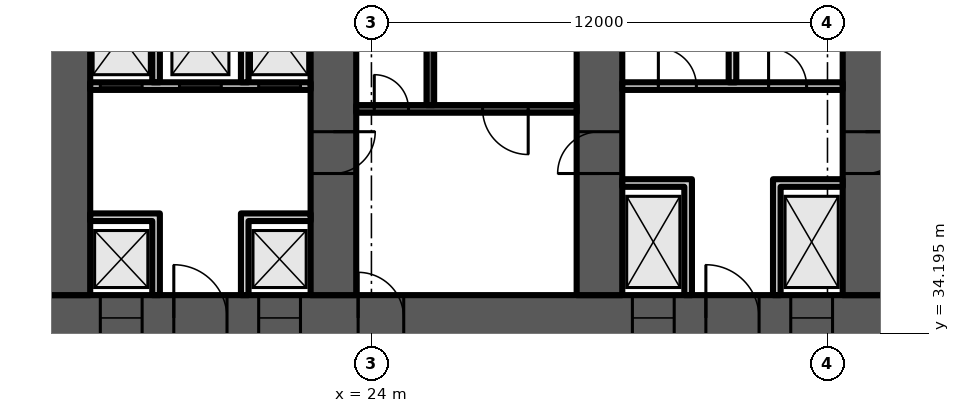
"""IFC4 building model, lengths in metres.
Left out: names, types, materials, properties, quantities, classifications, styles, units other than length and angle.
Written with IfcOpenShell. Run it as: python <this file> out.ifc"""

import sys

from ifc_helpers import new_model, si_unit, direction, frame, frame_2d, origin, place, context, subcontext, project, spatial, polyline, rectangle, outline, extrude, element, fill, save


model = new_model("IFC4")
c1 = context("Model", 3, precision=1e-05, world=origin(), true_north=direction((0.0, 1.0)))
c2 = subcontext(c1, "Body", "Model", "MODEL_VIEW")
j1 = project(units=[si_unit("LENGTHUNIT", "METRE"), si_unit("PLANEANGLEUNIT", "RADIAN")], contexts=[c1])
p1 = place(None, origin())
s1 = spatial("IfcSite", under=j1, at=p1, CompositionType="ELEMENT")
p2 = place(p1, origin())
s2 = spatial("IfcBuilding", under=s1, at=p2, CompositionType="ELEMENT")
p3 = place(p2, frame((0.0, 0.0, 59.5)))
s3 = spatial("IfcBuildingStorey", under=s2, at=p3, CompositionType="ELEMENT", Elevation=59.5)
p4 = place(p3, frame((9.0, 34.6, 0.0), z_axis=(0.0, 0.0, 1.0), x_axis=(1.0, 0.0, 0.0)))
e1 = element("IfcWall", 1, at=p4, inside=s3, PredefinedType="SHEAR", context=c2, shape_type="SweptSolid", body=[
    extrude(rectangle(XDim=56.0, YDim=1.2, at=frame_2d((28.0, 0.0))), origin(), (0.0, 0.0, 1.0), 3.6),
])
p5 = place(p4, frame((2.0, 0.0, 0.0)))
e2 = element("IfcOpeningElement", 2, at=p5, cuts=e1, PredefinedType="OPENING", context=c2, shape_type="SweptSolid", body=[
    extrude(rectangle(XDim=1.0, YDim=2.1, at=frame_2d((0.5, 1.05))), frame((0.0, 0.61, 0.0), z_axis=(0.0, -1.0, 0.0), x_axis=(1.0, 0.0, 0.0)), (0.0, 0.0, 1.0), 1.22),
])
p6 = place(p4, frame((4.6, 0.0, 0.0)))
e3 = element("IfcOpeningElement", 3, at=p6, cuts=e1, PredefinedType="OPENING", context=c2, shape_type="SweptSolid", body=[
    extrude(rectangle(XDim=1.0, YDim=2.1, at=frame_2d((0.5, 1.05))), frame((0.0, 0.61, 0.0), z_axis=(0.0, -1.0, 0.0), x_axis=(1.0, 0.0, 0.0)), (0.0, 0.0, 1.0), 1.22),
])
p7 = place(p4, frame((7.867, 0.0, 0.0)))
e4 = element("IfcOpeningElement", 4, at=p7, cuts=e1, PredefinedType="OPENING", context=c2, shape_type="SweptSolid", body=[
    extrude(rectangle(XDim=1.1, YDim=2.1, at=frame_2d((0.55, 1.05))), frame((0.0, 0.61, 0.0), z_axis=(0.0, -1.0, 0.0), x_axis=(1.0, 0.0, 0.0)), (0.0, 0.0, 1.0), 1.22),
])
p8 = place(p4, frame((12.033, 0.0, 0.0)))
e5 = element("IfcOpeningElement", 5, at=p8, cuts=e1, PredefinedType="OPENING", context=c2, shape_type="SweptSolid", body=[
    extrude(rectangle(XDim=1.1, YDim=2.1, at=frame_2d((0.55, 1.05))), frame((0.0, 0.61, 0.0), z_axis=(0.0, -1.0, 0.0), x_axis=(1.0, 0.0, 0.0)), (0.0, 0.0, 1.0), 1.22),
])
p9 = place(p4, frame((9.8, 0.0, 0.0)))
e6 = element("IfcOpeningElement", 6, at=p9, cuts=e1, PredefinedType="OPENING", context=c2, shape_type="SweptSolid", body=[
    extrude(rectangle(XDim=1.4, YDim=2.1, at=frame_2d((0.7, 1.05))), frame((0.0, 0.61, 0.0), z_axis=(0.0, -1.0, 0.0), x_axis=(1.0, 0.0, 0.0)), (0.0, 0.0, 1.0), 1.22),
])
p10 = place(p4, frame((14.65, 0.0, 0.0)))
e7 = element("IfcOpeningElement", 7, at=p10, cuts=e1, PredefinedType="OPENING", context=c2, shape_type="SweptSolid", body=[
    extrude(rectangle(XDim=1.2, YDim=2.1, at=frame_2d((0.6, 1.05))), frame((0.0, 0.61, 0.0), z_axis=(0.0, -1.0, 0.0), x_axis=(1.0, 0.0, 0.0)), (0.0, 0.0, 1.0), 1.22),
])
p11 = place(p4, frame((21.867, 0.0, 0.0)))
e8 = element("IfcOpeningElement", 8, at=p11, cuts=e1, PredefinedType="OPENING", context=c2, shape_type="SweptSolid", body=[
    extrude(rectangle(XDim=1.1, YDim=2.1, at=frame_2d((0.55, 1.05))), frame((0.0, 0.61, 0.0), z_axis=(0.0, -1.0, 0.0), x_axis=(1.0, 0.0, 0.0)), (0.0, 0.0, 1.0), 1.22),
])
p12 = place(p4, frame((26.033, 0.0, 0.0)))
e9 = element("IfcOpeningElement", 9, at=p12, cuts=e1, PredefinedType="OPENING", context=c2, shape_type="SweptSolid", body=[
    extrude(rectangle(XDim=1.1, YDim=2.1, at=frame_2d((0.55, 1.05))), frame((0.0, 0.61, 0.0), z_axis=(0.0, -1.0, 0.0), x_axis=(1.0, 0.0, 0.0)), (0.0, 0.0, 1.0), 1.22),
])
p13 = place(p4, frame((23.8, 0.0, 0.0)))
e10 = element("IfcOpeningElement", 10, at=p13, cuts=e1, PredefinedType="OPENING", context=c2, shape_type="SweptSolid", body=[
    extrude(rectangle(XDim=1.4, YDim=2.1, at=frame_2d((0.7, 1.05))), frame((0.0, 0.61, 0.0), z_axis=(0.0, -1.0, 0.0), x_axis=(1.0, 0.0, 0.0)), (0.0, 0.0, 1.0), 1.22),
])
p14 = place(p4, frame((28.867, 0.0, 0.0)))
e11 = element("IfcOpeningElement", 11, at=p14, cuts=e1, PredefinedType="OPENING", context=c2, shape_type="SweptSolid", body=[
    extrude(rectangle(XDim=1.1, YDim=2.1, at=frame_2d((0.55, 1.05))), frame((0.0, 0.61, 0.0), z_axis=(0.0, -1.0, 0.0), x_axis=(1.0, 0.0, 0.0)), (0.0, 0.0, 1.0), 1.22),
])
p15 = place(p4, frame((33.033, 0.0, 0.0)))
e12 = element("IfcOpeningElement", 12, at=p15, cuts=e1, PredefinedType="OPENING", context=c2, shape_type="SweptSolid", body=[
    extrude(rectangle(XDim=1.1, YDim=2.1, at=frame_2d((0.55, 1.05))), frame((0.0, 0.61, 0.0), z_axis=(0.0, -1.0, 0.0), x_axis=(1.0, 0.0, 0.0)), (0.0, 0.0, 1.0), 1.22),
])
p16 = place(p4, frame((40.15, 0.0, 0.0)))
e13 = element("IfcOpeningElement", 13, at=p16, cuts=e1, PredefinedType="OPENING", context=c2, shape_type="SweptSolid", body=[
    extrude(rectangle(XDim=1.2, YDim=2.1, at=frame_2d((0.6, 1.05))), frame((0.0, 0.61, 0.0), z_axis=(0.0, -1.0, 0.0), x_axis=(1.0, 0.0, 0.0)), (0.0, 0.0, 1.0), 1.22),
])
p17 = place(p4, frame((44.8, 0.0, 0.0)))
e14 = element("IfcOpeningElement", 14, at=p17, cuts=e1, PredefinedType="OPENING", context=c2, shape_type="SweptSolid", body=[
    extrude(rectangle(XDim=1.4, YDim=2.1, at=frame_2d((0.7, 1.05))), frame((0.0, 0.61, 0.0), z_axis=(0.0, -1.0, 0.0), x_axis=(1.0, 0.0, 0.0)), (0.0, 0.0, 1.0), 1.22),
])
p18 = place(p4, frame((49.867, 0.0, 0.0)))
e15 = element("IfcOpeningElement", 15, at=p18, cuts=e1, PredefinedType="OPENING", context=c2, shape_type="SweptSolid", body=[
    extrude(rectangle(XDim=1.1, YDim=2.1, at=frame_2d((0.55, 1.05))), frame((0.0, 0.61, 0.0), z_axis=(0.0, -1.0, 0.0), x_axis=(1.0, 0.0, 0.0)), (0.0, 0.0, 1.0), 1.22),
])
p19 = place(p4, frame((53.5, 0.0, 0.0)))
e16 = element("IfcOpeningElement", 16, at=p19, cuts=e1, PredefinedType="OPENING", context=c2, shape_type="SweptSolid", body=[
    extrude(rectangle(XDim=1.1, YDim=2.1, at=frame_2d((0.55, 1.05))), frame((0.0, 0.61, 0.0), z_axis=(0.0, -1.0, 0.0), x_axis=(1.0, 0.0, 0.0)), (0.0, 0.0, 1.0), 1.22),
])
p20 = place(p4, frame((51.567, 0.0, 0.0)))
e17 = element("IfcOpeningElement", 17, at=p20, cuts=e1, PredefinedType="OPENING", context=c2, shape_type="SweptSolid", body=[
    extrude(rectangle(XDim=1.4, YDim=2.1, at=frame_2d((0.7, 1.05))), frame((0.0, 0.61, 0.0), z_axis=(0.0, -1.0, 0.0), x_axis=(1.0, 0.0, 0.0)), (0.0, 0.0, 1.0), 1.22),
])
p21 = place(p3, frame((16.0, 35.2, 0.0), z_axis=(0.0, 0.0, 1.0), x_axis=(0.0, 1.0, 0.0)))
e18 = element("IfcWall", 18, at=p21, inside=s3, PredefinedType="SHEAR", context=c2, shape_type="SweptSolid", body=[
    extrude(rectangle(XDim=12.943, YDim=1.2, at=frame_2d((6.471, 0.0))), origin(), (0.0, 0.0, 1.0), 3.6),
])
p22 = place(p21, frame((9.6, 0.0, 0.0)))
e19 = element("IfcOpeningElement", 19, at=p22, cuts=e18, PredefinedType="OPENING", context=c2, shape_type="SweptSolid", body=[
    extrude(rectangle(XDim=1.0, YDim=2.1, at=frame_2d((0.5, 1.05))), frame((0.0, 0.61, 0.0), z_axis=(0.0, -1.0, 0.0), x_axis=(1.0, 0.0, 0.0)), (0.0, 0.0, 1.0), 1.22),
])
p23 = place(p3, frame((23.0, 35.2, 0.0), z_axis=(0.0, 0.0, 1.0), x_axis=(0.0, 1.0, 0.0)))
e20 = element("IfcWall", 20, at=p23, inside=s3, PredefinedType="SHEAR", context=c2, shape_type="SweptSolid", body=[
    extrude(rectangle(XDim=13.555, YDim=1.2, at=frame_2d((6.778, 0.0))), origin(), (0.0, 0.0, 1.0), 3.6),
])
p24 = place(p23, frame((10.414, 0.0, 0.0)))
e21 = element("IfcOpeningElement", 21, at=p24, cuts=e20, PredefinedType="OPENING", context=c2, shape_type="SweptSolid", body=[
    extrude(rectangle(XDim=1.0, YDim=2.1, at=frame_2d((0.5, 1.05))), frame((0.0, 0.61, 0.0), z_axis=(0.0, -1.0, 0.0), x_axis=(1.0, 0.0, 0.0)), (0.0, 0.0, 1.0), 1.22),
])
p25 = place(p23, frame((3.2, 0.0, 0.0)))
e22 = element("IfcOpeningElement", 22, at=p25, cuts=e20, PredefinedType="OPENING", context=c2, shape_type="SweptSolid", body=[
    extrude(rectangle(XDim=1.1, YDim=2.1, at=frame_2d((0.55, 1.05))), frame((0.0, 0.61, 0.0), z_axis=(0.0, -1.0, 0.0), x_axis=(1.0, 0.0, 0.0)), (0.0, 0.0, 1.0), 1.22),
])
p26 = place(p3, frame((30.0, 35.2, 0.0), z_axis=(0.0, 0.0, 1.0), x_axis=(0.0, 1.0, 0.0)))
e23 = element("IfcWall", 23, at=p26, inside=s3, PredefinedType="SHEAR", context=c2, shape_type="SweptSolid", body=[
    extrude(rectangle(XDim=14.168, YDim=1.2, at=frame_2d((7.084, 0.0))), origin(), (0.0, 0.0, 1.0), 3.6),
])
p27 = place(p26, frame((3.2, 0.0, 0.0)))
e24 = element("IfcOpeningElement", 24, at=p27, cuts=e23, PredefinedType="OPENING", context=c2, shape_type="SweptSolid", body=[
    extrude(rectangle(XDim=1.1, YDim=2.1, at=frame_2d((0.55, 1.05))), frame((0.0, 0.61, 0.0), z_axis=(0.0, -1.0, 0.0), x_axis=(1.0, 0.0, 0.0)), (0.0, 0.0, 1.0), 1.22),
])
p28 = place(p3, frame((37.0, 35.2, 0.0), z_axis=(0.0, 0.0, 1.0), x_axis=(0.0, 1.0, 0.0)))
e25 = element("IfcWall", 25, at=p28, inside=s3, PredefinedType="SHEAR", context=c2, shape_type="SweptSolid", body=[
    extrude(rectangle(XDim=14.78, YDim=1.2, at=frame_2d((7.39, 0.0))), origin(), (0.0, 0.0, 1.0), 3.6),
])
p29 = place(p28, frame((3.2, 0.0, 0.0)))
e26 = element("IfcOpeningElement", 26, at=p29, cuts=e25, PredefinedType="OPENING", context=c2, shape_type="SweptSolid", body=[
    extrude(rectangle(XDim=1.1, YDim=2.1, at=frame_2d((0.55, 1.05))), frame((0.0, 0.61, 0.0), z_axis=(0.0, -1.0, 0.0), x_axis=(1.0, 0.0, 0.0)), (0.0, 0.0, 1.0), 1.22),
])
p30 = place(p28, frame((9.6, 0.0, 0.0)))
e27 = element("IfcOpeningElement", 27, at=p30, cuts=e25, PredefinedType="OPENING", context=c2, shape_type="SweptSolid", body=[
    extrude(rectangle(XDim=1.0, YDim=2.1, at=frame_2d((0.5, 1.05))), frame((0.0, 0.61, 0.0), z_axis=(0.0, -1.0, 0.0), x_axis=(1.0, 0.0, 0.0)), (0.0, 0.0, 1.0), 1.22),
])
p31 = place(p3, frame((16.6, 40.7, 0.0), z_axis=(0.0, 0.0, 1.0), x_axis=(1.0, 0.0, 0.0)))
e28 = element("IfcWall", 28, at=p31, inside=s3, PredefinedType="PARTITIONING", context=c2, shape_type="SweptSolid", body=[
    extrude(rectangle(XDim=5.8, YDim=0.2, at=frame_2d((2.9, 0.0))), origin(), (0.0, 0.0, 1.0), 3.2),
])
p32 = place(p31, frame((0.267, 0.0, 0.0)))
e29 = element("IfcOpeningElement", 29, at=p32, cuts=e28, PredefinedType="OPENING", context=c2, shape_type="SweptSolid", body=[
    extrude(rectangle(XDim=1.1, YDim=2.1, at=frame_2d((0.55, 1.05))), frame((0.0, 0.11, 0.0), z_axis=(0.0, -1.0, 0.0), x_axis=(1.0, 0.0, 0.0)), (0.0, 0.0, 1.0), 0.22),
])
p33 = place(p31, frame((2.35, 0.0, 0.0)))
e30 = element("IfcOpeningElement", 30, at=p33, cuts=e28, PredefinedType="OPENING", context=c2, shape_type="SweptSolid", body=[
    extrude(rectangle(XDim=1.1, YDim=2.1, at=frame_2d((0.55, 1.05))), frame((0.0, 0.11, 0.0), z_axis=(0.0, -1.0, 0.0), x_axis=(1.0, 0.0, 0.0)), (0.0, 0.0, 1.0), 0.22),
])
p34 = place(p31, frame((4.433, 0.0, 0.0)))
e31 = element("IfcOpeningElement", 31, at=p34, cuts=e28, PredefinedType="OPENING", context=c2, shape_type="SweptSolid", body=[
    extrude(rectangle(XDim=1.1, YDim=2.1, at=frame_2d((0.55, 1.05))), frame((0.0, 0.11, 0.0), z_axis=(0.0, -1.0, 0.0), x_axis=(1.0, 0.0, 0.0)), (0.0, 0.0, 1.0), 0.22),
])
p35 = place(p3, frame((0.0, 0.0, -0.0)))
e32 = element("IfcWall", 32, at=p35, inside=s3, PredefinedType="PARTITIONING", context=c2, shape_type="SweptSolid", body=[
    extrude(outline(polyline([(18.233, 37.15), (16.6, 37.15), (16.6, 37.35), (18.233, 37.35), (18.433, 37.35), (18.433, 35.2), (18.233, 35.2), (18.233, 37.15)])), origin(), (0.0, 0.0, 1.0), 3.2),
])
p36 = place(p3, frame((0.0, 0.0, -0.0)))
e33 = element("IfcWall", 33, at=p36, inside=s3, PredefinedType="PARTITIONING", context=c2, shape_type="SweptSolid", body=[
    extrude(outline(polyline([(20.567, 37.35), (20.767, 37.35), (22.4, 37.35), (22.4, 37.15), (20.767, 37.15), (20.767, 35.2), (20.567, 35.2), (20.567, 37.35)])), origin(), (0.0, 0.0, 1.0), 3.2),
])
p37 = place(p3, frame((0.0, 0.0, -0.0)))
e34 = element("IfcWall", 34, at=p37, inside=s3, PredefinedType="PARTITIONING", context=c2, shape_type="SweptSolid", body=[
    extrude(outline(polyline([(18.433, 40.8), (18.233, 40.8), (18.233, 43.8), (16.6, 43.8), (16.6, 44.0), (22.4, 44.0), (22.4, 43.8), (20.767, 43.8), (20.767, 40.8), (20.567, 40.8), (20.567, 43.8), (18.433, 43.8), (18.433, 40.8)])), origin(), (0.0, 0.0, 1.0), 3.2),
])
p38 = place(p3, frame((23.6, 40.1, 0.0), z_axis=(0.0, 0.0, 1.0), x_axis=(1.0, 0.0, 0.0)))
e35 = element("IfcWall", 35, at=p38, inside=s3, PredefinedType="SHEAR", context=c2, shape_type="SweptSolid", body=[
    extrude(rectangle(XDim=5.8, YDim=0.2, at=frame_2d((2.9, 0.0))), origin(), (0.0, 0.0, 1.0), 3.2),
])
p39 = place(p38, frame((3.325, 0.0, 0.0)))
e36 = element("IfcOpeningElement", 36, at=p39, cuts=e35, PredefinedType="OPENING", context=c2, shape_type="SweptSolid", body=[
    extrude(rectangle(XDim=1.2, YDim=2.1, at=frame_2d((0.6, 1.05))), frame((0.0, 0.11, 0.0), z_axis=(0.0, -1.0, 0.0), x_axis=(1.0, 0.0, 0.0)), (0.0, 0.0, 1.0), 0.22),
])
p40 = place(p38, frame((0.475, 0.0, 0.0)))
e37 = element("IfcOpeningElement", 37, at=p40, cuts=e35, PredefinedType="OPENING", context=c2, shape_type="SweptSolid", body=[
    extrude(rectangle(XDim=0.9, YDim=2.1, at=frame_2d((0.45, 1.05))), frame((0.0, 0.11, 0.0), z_axis=(0.0, -1.0, 0.0), x_axis=(1.0, 0.0, 0.0)), (0.0, 0.0, 1.0), 0.22),
])
p41 = place(p3, frame((25.55, 40.2, 0.0), z_axis=(0.0, 0.0, 1.0), x_axis=(0.0, 1.0, 0.0)))
e38 = element("IfcWall", 38, at=p41, inside=s3, PredefinedType="SHEAR", context=c2, shape_type="SweptSolid", body=[
    extrude(rectangle(XDim=7.2, YDim=0.2, at=frame_2d((3.6, 0.0))), origin(), (0.0, 0.0, 1.0), 3.2),
])
p42 = place(p3, frame((30.6, 40.7, 0.0), z_axis=(0.0, 0.0, 1.0), x_axis=(1.0, 0.0, 0.0)))
e39 = element("IfcWall", 39, at=p42, inside=s3, PredefinedType="PARTITIONING", context=c2, shape_type="SweptSolid", body=[
    extrude(rectangle(XDim=5.8, YDim=0.2, at=frame_2d((2.9, 0.0))), origin(), (0.0, 0.0, 1.0), 3.2),
])
p43 = place(p42, frame((0.95, 0.0, 0.0)))
e40 = element("IfcOpeningElement", 40, at=p43, cuts=e39, PredefinedType="OPENING", context=c2, shape_type="SweptSolid", body=[
    extrude(rectangle(XDim=1.0, YDim=2.1, at=frame_2d((0.5, 1.05))), frame((0.0, 0.11, 0.0), z_axis=(0.0, -1.0, 0.0), x_axis=(1.0, 0.0, 0.0)), (0.0, 0.0, 1.0), 0.22),
])
p44 = place(p42, frame((3.85, 0.0, 0.0)))
e41 = element("IfcOpeningElement", 41, at=p44, cuts=e39, PredefinedType="OPENING", context=c2, shape_type="SweptSolid", body=[
    extrude(rectangle(XDim=1.0, YDim=2.1, at=frame_2d((0.5, 1.05))), frame((0.0, 0.11, 0.0), z_axis=(0.0, -1.0, 0.0), x_axis=(1.0, 0.0, 0.0)), (0.0, 0.0, 1.0), 0.22),
])
p45 = place(p3, frame((0.0, 0.0, -0.0)))
e42 = element("IfcWall", 42, at=p45, inside=s3, PredefinedType="PARTITIONING", context=c2, shape_type="SweptSolid", body=[
    extrude(outline(polyline([(32.233, 38.05), (30.6, 38.05), (30.6, 38.25), (32.233, 38.25), (32.433, 38.25), (32.433, 35.2), (32.233, 35.2), (32.233, 38.05)])), origin(), (0.0, 0.0, 1.0), 3.2),
])
p46 = place(p3, frame((0.0, 0.0, -0.0)))
e43 = element("IfcWall", 43, at=p46, inside=s3, PredefinedType="PARTITIONING", context=c2, shape_type="SweptSolid", body=[
    extrude(outline(polyline([(34.567, 38.25), (34.767, 38.25), (36.4, 38.25), (36.4, 38.05), (34.767, 38.05), (34.767, 35.2), (34.567, 35.2), (34.567, 38.25)])), origin(), (0.0, 0.0, 1.0), 3.2),
])
p47 = place(p3, frame((33.5, 40.8, 0.0), z_axis=(0.0, 0.0, 1.0), x_axis=(0.0, 1.0, 0.0)))
e44 = element("IfcWall", 44, at=p47, inside=s3, PredefinedType="PARTITIONING", context=c2, shape_type="SweptSolid", body=[
    extrude(rectangle(XDim=8.653, YDim=0.2, at=frame_2d((4.326, 0.0))), origin(), (0.0, 0.0, 1.0), 3.2),
])
p48 = place(p7, origin())
e45 = element("IfcDoor", 45, at=p48, inside=s3, OperationType="DOUBLE_DOOR_SLIDING", PredefinedType="DOOR", context=c2, shape_type="SweptSolid", body=[
    extrude(rectangle(XDim=1.1, YDim=2.1, at=frame_2d((0.55, 1.05))), frame((0.0, 0.025, 0.0), z_axis=(0.0, -1.0, 0.0), x_axis=(1.0, 0.0, 0.0)), (0.0, 0.0, 1.0), 0.05),
])
fill(e4, e45)
p49 = place(p8, origin())
e46 = element("IfcDoor", 46, at=p49, inside=s3, OperationType="DOUBLE_DOOR_SLIDING", PredefinedType="DOOR", context=c2, shape_type="SweptSolid", body=[
    extrude(rectangle(XDim=1.1, YDim=2.1, at=frame_2d((0.55, 1.05))), frame((0.0, 0.025, 0.0), z_axis=(0.0, -1.0, 0.0), x_axis=(1.0, 0.0, 0.0)), (0.0, 0.0, 1.0), 0.05),
])
fill(e5, e46)
p50 = place(p9, origin())
e47 = element("IfcDoor", 47, at=p50, inside=s3, OperationType="DOUBLE_DOOR_SINGLE_SWING", PredefinedType="DOOR", context=c2, shape_type="SweptSolid", body=[
    extrude(rectangle(XDim=1.4, YDim=2.1, at=frame_2d((0.7, 1.05))), frame((0.0, 0.025, 0.0), z_axis=(0.0, -1.0, 0.0), x_axis=(1.0, 0.0, 0.0)), (0.0, 0.0, 1.0), 0.05),
])
fill(e6, e47)
p51 = place(p32, origin())
e48 = element("IfcDoor", 48, at=p51, inside=s3, OperationType="DOUBLE_DOOR_SLIDING", PredefinedType="DOOR", context=c2, shape_type="SweptSolid", body=[
    extrude(rectangle(XDim=1.1, YDim=2.1, at=frame_2d((0.55, 1.05))), frame((0.0, 0.025, 0.0), z_axis=(0.0, -1.0, 0.0), x_axis=(1.0, 0.0, 0.0)), (0.0, 0.0, 1.0), 0.05),
])
fill(e29, e48)
p52 = place(p33, origin())
e49 = element("IfcDoor", 49, at=p52, inside=s3, OperationType="DOUBLE_DOOR_SLIDING", PredefinedType="DOOR", context=c2, shape_type="SweptSolid", body=[
    extrude(rectangle(XDim=1.1, YDim=2.1, at=frame_2d((0.55, 1.05))), frame((0.0, 0.025, 0.0), z_axis=(0.0, -1.0, 0.0), x_axis=(1.0, 0.0, 0.0)), (0.0, 0.0, 1.0), 0.05),
])
fill(e30, e49)
p53 = place(p34, origin())
e50 = element("IfcDoor", 50, at=p53, inside=s3, OperationType="DOUBLE_DOOR_SLIDING", PredefinedType="DOOR", context=c2, shape_type="SweptSolid", body=[
    extrude(rectangle(XDim=1.1, YDim=2.1, at=frame_2d((0.55, 1.05))), frame((0.0, 0.025, 0.0), z_axis=(0.0, -1.0, 0.0), x_axis=(1.0, 0.0, 0.0)), (0.0, 0.0, 1.0), 0.05),
])
fill(e31, e50)
p54 = place(p39, origin())
e51 = element("IfcDoor", 51, at=p54, inside=s3, OperationType="SINGLE_SWING_RIGHT", PredefinedType="DOOR", context=c2, shape_type="SweptSolid", body=[
    extrude(rectangle(XDim=1.2, YDim=2.1, at=frame_2d((0.6, 1.05))), frame((0.0, 0.025, 0.0), z_axis=(0.0, -1.0, 0.0), x_axis=(1.0, 0.0, 0.0)), (0.0, 0.0, 1.0), 0.05),
])
fill(e36, e51)
p55 = place(p40, origin())
e52 = element("IfcDoor", 52, at=p55, inside=s3, OperationType="SINGLE_SWING_LEFT", PredefinedType="DOOR", context=c2, shape_type="SweptSolid", body=[
    extrude(rectangle(XDim=0.9, YDim=2.1, at=frame_2d((0.45, 1.05))), frame((0.0, 0.025, 0.0), z_axis=(0.0, -1.0, 0.0), x_axis=(1.0, 0.0, 0.0)), (0.0, 0.0, 1.0), 0.05),
])
fill(e37, e52)
p56 = place(p10, origin())
e53 = element("IfcDoor", 53, at=p56, inside=s3, OperationType="SINGLE_SWING_LEFT", PredefinedType="DOOR", context=c2, shape_type="SweptSolid", body=[
    extrude(rectangle(XDim=1.2, YDim=2.1, at=frame_2d((0.6, 1.05))), frame((0.0, 0.025, 0.0), z_axis=(0.0, -1.0, 0.0), x_axis=(1.0, 0.0, 0.0)), (0.0, 0.0, 1.0), 0.05),
])
fill(e7, e53)
p57 = place(p11, origin())
e54 = element("IfcDoor", 54, at=p57, inside=s3, OperationType="DOUBLE_DOOR_SLIDING", PredefinedType="DOOR", context=c2, shape_type="SweptSolid", body=[
    extrude(rectangle(XDim=1.1, YDim=2.1, at=frame_2d((0.55, 1.05))), frame((0.0, 0.025, 0.0), z_axis=(0.0, -1.0, 0.0), x_axis=(1.0, 0.0, 0.0)), (0.0, 0.0, 1.0), 0.05),
])
fill(e8, e54)
p58 = place(p12, origin())
e55 = element("IfcDoor", 55, at=p58, inside=s3, OperationType="DOUBLE_DOOR_SLIDING", PredefinedType="DOOR", context=c2, shape_type="SweptSolid", body=[
    extrude(rectangle(XDim=1.1, YDim=2.1, at=frame_2d((0.55, 1.05))), frame((0.0, 0.025, 0.0), z_axis=(0.0, -1.0, 0.0), x_axis=(1.0, 0.0, 0.0)), (0.0, 0.0, 1.0), 0.05),
])
fill(e9, e55)
p59 = place(p13, origin())
e56 = element("IfcDoor", 56, at=p59, inside=s3, OperationType="DOUBLE_DOOR_SINGLE_SWING", PredefinedType="DOOR", context=c2, shape_type="SweptSolid", body=[
    extrude(rectangle(XDim=1.4, YDim=2.1, at=frame_2d((0.7, 1.05))), frame((0.0, 0.025, 0.0), z_axis=(0.0, -1.0, 0.0), x_axis=(1.0, 0.0, 0.0)), (0.0, 0.0, 1.0), 0.05),
])
fill(e10, e56)
p60 = place(p43, origin())
e57 = element("IfcDoor", 57, at=p60, inside=s3, OperationType="SINGLE_SWING_LEFT", PredefinedType="DOOR", context=c2, shape_type="SweptSolid", body=[
    extrude(rectangle(XDim=1.0, YDim=2.1, at=frame_2d((0.5, 1.05))), frame((0.0, 0.025, 0.0), z_axis=(0.0, -1.0, 0.0), x_axis=(1.0, 0.0, 0.0)), (0.0, 0.0, 1.0), 0.05),
])
fill(e40, e57)
p61 = place(p44, origin())
e58 = element("IfcDoor", 58, at=p61, inside=s3, OperationType="SINGLE_SWING_LEFT", PredefinedType="DOOR", context=c2, shape_type="SweptSolid", body=[
    extrude(rectangle(XDim=1.0, YDim=2.1, at=frame_2d((0.5, 1.05))), frame((0.0, 0.025, 0.0), z_axis=(0.0, -1.0, 0.0), x_axis=(1.0, 0.0, 0.0)), (0.0, 0.0, 1.0), 0.05),
])
fill(e41, e58)
p62 = place(p25, origin())
e59 = element("IfcDoor", 59, at=p62, inside=s3, OperationType="SINGLE_SWING_RIGHT", PredefinedType="DOOR", context=c2, shape_type="SweptSolid", body=[
    extrude(rectangle(XDim=1.1, YDim=2.1, at=frame_2d((0.55, 1.05))), frame((0.0, 0.025, 0.0), z_axis=(0.0, -1.0, 0.0), x_axis=(1.0, 0.0, 0.0)), (0.0, 0.0, 1.0), 0.05),
])
fill(e22, e59)
p63 = place(p27, origin())
e60 = element("IfcDoor", 60, at=p63, inside=s3, OperationType="SINGLE_SWING_LEFT", PredefinedType="DOOR", context=c2, shape_type="SweptSolid", body=[
    extrude(rectangle(XDim=1.1, YDim=2.1, at=frame_2d((0.55, 1.05))), frame((0.0, 0.025, 0.0), z_axis=(0.0, -1.0, 0.0), x_axis=(1.0, 0.0, 0.0)), (0.0, 0.0, 1.0), 0.05),
])
fill(e24, e60)
p64 = place(p29, origin())
e61 = element("IfcDoor", 61, at=p64, inside=s3, OperationType="SINGLE_SWING_RIGHT", PredefinedType="DOOR", context=c2, shape_type="SweptSolid", body=[
    extrude(rectangle(XDim=1.1, YDim=2.1, at=frame_2d((0.55, 1.05))), frame((0.0, 0.025, 0.0), z_axis=(0.0, -1.0, 0.0), x_axis=(1.0, 0.0, 0.0)), (0.0, 0.0, 1.0), 0.05),
])
fill(e26, e61)
save(model, sys.argv[1])
